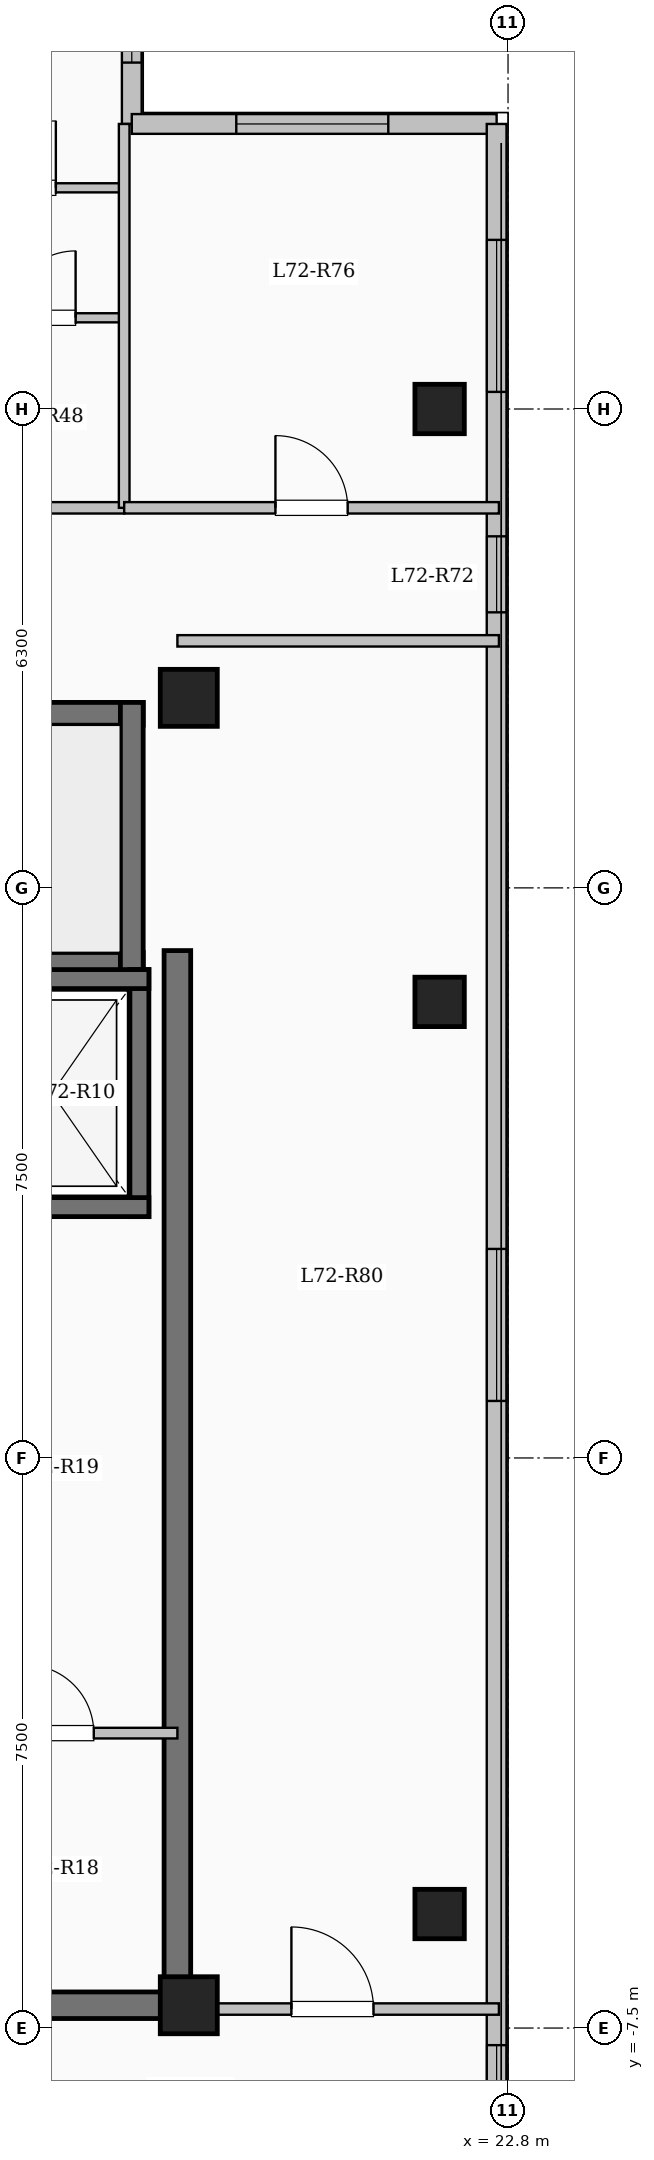
"""IFC4 building model, lengths in metres.
Left out: names, types, materials, properties, quantities, classifications, styles, units other than length and angle.
Written with IfcOpenShell. Run it as: python <this file> out.ifc"""

import sys

from ifc_helpers import new_model, si_unit, direction, frame, frame_2d, origin, origin_2d, place, context, subcontext, project, spatial, rectangle, extrude, element, fill, save


model = new_model("IFC4")
c1 = context("Model", 3, precision=1e-05, world=origin(), true_north=direction((0.0, 1.0)))
c2 = subcontext(c1, "Body", "Model", "MODEL_VIEW")
j1 = project(units=[si_unit("LENGTHUNIT", "METRE"), si_unit("PLANEANGLEUNIT", "RADIAN")], contexts=[c1])
p1 = place(None, origin())
s1 = spatial("IfcSite", under=j1, at=p1, CompositionType="ELEMENT")
p2 = place(p1, origin())
s2 = spatial("IfcBuilding", under=s1, at=p2, CompositionType="ELEMENT")
p3 = place(p2, frame((0.0, 0.0, 264.95)))
s3 = spatial("IfcBuildingStorey", under=s2, at=p3, CompositionType="ELEMENT", Elevation=264.95)
for number, where, z_axis, x_axis in (
    (1, (18.6, -7.2, 0.0), (0.0, 0.0, 1.0), (1.0, 0.0, 0.0)),
    (2, (18.6, 10.0, 0.0), (0.0, 0.0, 1.0), (1.0, 0.0, 0.0)),
):
    element("IfcColumn", number, at=place(p3, frame(where, z_axis=z_axis, x_axis=x_axis)), inside=s3, PredefinedType="COLUMN", context=c2, shape_type="SweptSolid", body=[
        extrude(rectangle(XDim=0.75, YDim=0.75, at=origin_2d()), origin(), (0.0, 0.0, 1.0), 3.35),
    ])
for number, where, z_axis, x_axis in (
    (3, (21.9, -6.0, 0.0), (0.0, 0.0, 1.0), (1.0, 0.0, 0.0)),
    (4, (21.9, 6.0, 0.0), (0.0, 0.0, 1.0), (1.0, 0.0, 0.0)),
    (5, (21.9, 13.8, 0.0), (0.0, 0.0, 1.0), (1.0, 0.0, 0.0)),
):
    element("IfcColumn", number, at=place(p3, frame(where, z_axis=z_axis, x_axis=x_axis)), inside=s3, PredefinedType="COLUMN", context=c2, shape_type="SweptSolid", body=[
        extrude(rectangle(XDim=0.65, YDim=0.65, at=origin_2d()), origin(), (0.0, 0.0, 1.0), 3.35),
    ])
p4 = place(p3, frame((17.85, 20.85, 0.0), z_axis=(0.0, 0.0, 1.0), x_axis=(0.0, -1.0, 0.0)))
e6 = element("IfcWall", 6, at=p4, inside=s3, PredefinedType="SOLIDWALL", context=c2, shape_type="SweptSolid", body=[
    extrude(rectangle(XDim=3.3, YDim=0.26, at=frame_2d((1.65, 0.0))), origin(), (0.0, 0.0, 1.0), 3.1),
])
p5 = place(p4, frame((0.843, 0.0, 0.9)))
e7 = element("IfcOpeningElement", 7, at=p5, cuts=e6, PredefinedType="OPENING", context=c2, shape_type="SweptSolid", body=[
    extrude(rectangle(XDim=1.65, YDim=1.6, at=frame_2d((0.825, 0.8))), frame((0.0, 0.14, 0.0), z_axis=(0.0, -1.0, 0.0), x_axis=(1.0, 0.0, 0.0)), (0.0, 0.0, 1.0), 0.28),
])
p6 = place(p3, frame((17.85, 17.55, 0.0), z_axis=(0.0, 0.0, 1.0), x_axis=(1.0, 0.0, 0.0)))
e8 = element("IfcWall", 8, at=p6, inside=s3, PredefinedType="SOLIDWALL", context=c2, shape_type="SweptSolid", body=[
    extrude(rectangle(XDim=4.8, YDim=0.26, at=frame_2d((2.4, 0.0))), origin(), (0.0, 0.0, 1.0), 3.1),
])
p7 = place(p6, frame((1.375, 0.0, 0.9)))
e9 = element("IfcOpeningElement", 9, at=p7, cuts=e8, PredefinedType="OPENING", context=c2, shape_type="SweptSolid", body=[
    extrude(rectangle(XDim=2.0, YDim=1.7, at=frame_2d((1.0, 0.85))), frame((0.0, 0.14, 0.0), z_axis=(0.0, -1.0, 0.0), x_axis=(1.0, 0.0, 0.0)), (0.0, 0.0, 1.0), 0.28),
])
p8 = place(p3, frame((22.65, 17.55, 0.0), z_axis=(0.0, 0.0, 1.0), x_axis=(0.0, -1.0, 0.0)))
e10 = element("IfcWall", 10, at=p8, inside=s3, PredefinedType="SOLIDWALL", context=c2, shape_type="SweptSolid", body=[
    extrude(rectangle(XDim=35.1, YDim=0.26, at=frame_2d((17.55, 0.0))), origin(), (0.0, 0.0, 1.0), 3.1),
])
p9 = place(p8, frame((1.525, 0.0, 0.9)))
e11 = element("IfcOpeningElement", 11, at=p9, cuts=e10, PredefinedType="OPENING", context=c2, shape_type="SweptSolid", body=[
    extrude(rectangle(XDim=2.0, YDim=1.7, at=frame_2d((1.0, 0.85))), frame((0.0, 0.14, 0.0), z_axis=(0.0, -1.0, 0.0), x_axis=(1.0, 0.0, 0.0)), (0.0, 0.0, 1.0), 0.28),
])
p10 = place(p8, frame((5.425, 0.0, 0.95)))
e12 = element("IfcOpeningElement", 12, at=p10, cuts=e10, PredefinedType="OPENING", context=c2, shape_type="SweptSolid", body=[
    extrude(rectangle(XDim=1.0, YDim=1.5, at=frame_2d((0.5, 0.75))), frame((0.0, 0.14, 0.0), z_axis=(0.0, -1.0, 0.0), x_axis=(1.0, 0.0, 0.0)), (0.0, 0.0, 1.0), 0.28),
])
p11 = place(p8, frame((14.8, 0.0, 0.9)))
e13 = element("IfcOpeningElement", 13, at=p11, cuts=e10, PredefinedType="OPENING", context=c2, shape_type="SweptSolid", body=[
    extrude(rectangle(XDim=2.0, YDim=1.7, at=frame_2d((1.0, 0.85))), frame((0.0, 0.14, 0.0), z_axis=(0.0, -1.0, 0.0), x_axis=(1.0, 0.0, 0.0)), (0.0, 0.0, 1.0), 0.28),
])
p12 = place(p8, frame((25.275, 0.0, 0.95)))
e14 = element("IfcOpeningElement", 14, at=p12, cuts=e10, PredefinedType="OPENING", context=c2, shape_type="SweptSolid", body=[
    extrude(rectangle(XDim=1.2, YDim=1.5, at=frame_2d((0.6, 0.75))), frame((0.0, 0.14, 0.0), z_axis=(0.0, -1.0, 0.0), x_axis=(1.0, 0.0, 0.0)), (0.0, 0.0, 1.0), 0.28),
])
p13 = place(p8, frame((29.925, 0.0, 0.9)))
e15 = element("IfcOpeningElement", 15, at=p13, cuts=e10, PredefinedType="OPENING", context=c2, shape_type="SweptSolid", body=[
    extrude(rectangle(XDim=2.2, YDim=1.75, at=frame_2d((1.1, 0.875))), frame((0.0, 0.14, 0.0), z_axis=(0.0, -1.0, 0.0), x_axis=(1.0, 0.0, 0.0)), (0.0, 0.0, 1.0), 0.28),
])
p14 = place(p3, frame((10.0, 9.79, 0.0), z_axis=(0.0, 0.0, 1.0), x_axis=(1.0, 0.0, 0.0)))
e16 = element("IfcWall", 16, at=p14, inside=s3, PredefinedType="SHEAR", context=c2, shape_type="SweptSolid", body=[
    extrude(rectangle(XDim=8.0, YDim=0.3, at=frame_2d((4.0, 0.0))), origin(), (0.0, 0.0, 1.0), 3.35),
])
p15 = place(p3, frame((10.0, 6.5, 0.0), z_axis=(0.0, 0.0, 1.0), x_axis=(1.0, 0.0, 0.0)))
e17 = element("IfcWall", 17, at=p15, inside=s3, PredefinedType="SHEAR", context=c2, shape_type="SweptSolid", body=[
    extrude(rectangle(XDim=8.0, YDim=0.3, at=frame_2d((4.0, 0.0))), origin(), (0.0, 0.0, 1.0), 3.35),
])
p16 = place(p15, frame((0.55, 0.0, 0.0)))
e18 = element("IfcOpeningElement", 18, at=p16, cuts=e17, PredefinedType="OPENING", context=c2, shape_type="SweptSolid", body=[
    extrude(rectangle(XDim=1.0, YDim=2.15, at=frame_2d((0.5, 1.075))), frame((0.0, 0.16, 0.0), z_axis=(0.0, -1.0, 0.0), x_axis=(1.0, 0.0, 0.0)), (0.0, 0.0, 1.0), 0.32),
])
p17 = place(p3, frame((17.85, 6.35, 0.0), z_axis=(0.0, 0.0, 1.0), x_axis=(0.0, 1.0, 0.0)))
e19 = element("IfcWall", 19, at=p17, inside=s3, PredefinedType="SHEAR", context=c2, shape_type="SweptSolid", body=[
    extrude(rectangle(XDim=3.59, YDim=0.3, at=frame_2d((1.795, 0.0))), origin(), (0.0, 0.0, 1.0), 3.35),
])
p18 = place(p3, frame((17.95, 3.175, 0.0), z_axis=(0.0, 0.0, 1.0), x_axis=(0.0, 1.0, 0.0)))
e20 = element("IfcWall", 20, at=p18, inside=s3, PredefinedType="SHEAR", context=c2, shape_type="SweptSolid", body=[
    extrude(rectangle(XDim=3.25, YDim=0.25, at=frame_2d((1.625, 0.0))), origin(), (0.0, 0.0, 1.0), 3.35),
])
for number, where, z_axis, x_axis in (
    (21, (15.525, 3.3, 0.0), (0.0, 0.0, 1.0), (1.0, 0.0, 0.0)),
    (22, (15.525, 6.3, 0.0), (0.0, 0.0, 1.0), (1.0, 0.0, 0.0)),
):
    element("IfcWall", number, at=place(p3, frame(where, z_axis=z_axis, x_axis=x_axis)), inside=s3, PredefinedType="SHEAR", context=c2, shape_type="SweptSolid", body=[
        extrude(rectangle(XDim=2.55, YDim=0.25, at=frame_2d((1.275, 0.0))), origin(), (0.0, 0.0, 1.0), 3.35),
    ])
p19 = place(p3, frame((18.45, -7.375, 0.0), z_axis=(0.0, 0.0, 1.0), x_axis=(0.0, 1.0, 0.0)))
e23 = element("IfcWall", 23, at=p19, inside=s3, PredefinedType="SHEAR", context=c2, shape_type="SweptSolid", body=[
    extrude(rectangle(XDim=14.05, YDim=0.35, at=frame_2d((7.025, 0.0))), origin(), (0.0, 0.0, 1.0), 3.35),
])
p20 = place(p3, frame((12.625, -7.2, 0.0), z_axis=(0.0, 0.0, 1.0), x_axis=(1.0, 0.0, 0.0)))
e24 = element("IfcWall", 24, at=p20, inside=s3, PredefinedType="SHEAR", context=c2, shape_type="SweptSolid", body=[
    extrude(rectangle(XDim=6.0, YDim=0.35, at=frame_2d((3.0, 0.0))), origin(), (0.0, 0.0, 1.0), 3.35),
])
p21 = place(p3, frame((15.4, -3.62, 0.0), z_axis=(0.0, 0.0, 1.0), x_axis=(1.0, 0.0, 0.0)))
e25 = element("IfcWall", 25, at=p21, inside=s3, PredefinedType="PARTITIONING", context=c2, shape_type="SweptSolid", body=[
    extrude(rectangle(XDim=3.05, YDim=0.14, at=frame_2d((1.525, 0.0))), origin(), (0.0, 0.0, 1.0), 3.1),
])
p22 = place(p21, frame((1.05, 0.0, 0.0)))
e26 = element("IfcOpeningElement", 26, at=p22, cuts=e25, PredefinedType="OPENING", context=c2, shape_type="SweptSolid", body=[
    extrude(rectangle(XDim=0.9, YDim=2.08, at=frame_2d((0.45, 1.04))), frame((0.0, 0.08, 0.0), z_axis=(0.0, -1.0, 0.0), x_axis=(1.0, 0.0, 0.0)), (0.0, 0.0, 1.0), 0.16),
])
p23 = place(p3, frame((3.85, 12.5, 0.0), z_axis=(0.0, 0.0, 1.0), x_axis=(1.0, 0.0, 0.0)))
e27 = element("IfcWall", 27, at=p23, inside=s3, PredefinedType="PARTITIONING", context=c2, shape_type="SweptSolid", body=[
    extrude(rectangle(XDim=13.9, YDim=0.15, at=frame_2d((6.95, 0.0))), origin(), (0.0, 0.0, 1.0), 3.1),
])
p24 = place(p23, frame((0.7, 0.0, 0.0)))
e28 = element("IfcOpeningElement", 28, at=p24, cuts=e27, PredefinedType="OPENING", context=c2, shape_type="SweptSolid", body=[
    extrude(rectangle(XDim=0.96, YDim=2.15, at=frame_2d((0.48, 1.075))), frame((0.0, 0.085, 0.0), z_axis=(0.0, -1.0, 0.0), x_axis=(1.0, 0.0, 0.0)), (0.0, 0.0, 1.0), 0.17),
])
p25 = place(p23, frame((6.35, 0.0, 0.0)))
e29 = element("IfcOpeningElement", 29, at=p25, cuts=e27, PredefinedType="OPENING", context=c2, shape_type="SweptSolid", body=[
    extrude(rectangle(XDim=0.96, YDim=2.15, at=frame_2d((0.48, 1.075))), frame((0.0, 0.085, 0.0), z_axis=(0.0, -1.0, 0.0), x_axis=(1.0, 0.0, 0.0)), (0.0, 0.0, 1.0), 0.17),
])
p26 = place(p3, frame((15.592, 15.0, 0.0), z_axis=(0.0, 0.0, 1.0), x_axis=(1.0, 0.0, 0.0)))
e30 = element("IfcWall", 30, at=p26, inside=s3, PredefinedType="PARTITIONING", context=c2, shape_type="SweptSolid", body=[
    extrude(rectangle(XDim=2.158, YDim=0.12, at=frame_2d((1.079, 0.0))), origin(), (0.0, 0.0, 1.0), 3.1),
])
p27 = place(p26, frame((0.639, 0.0, 0.0)))
e31 = element("IfcOpeningElement", 31, at=p27, cuts=e30, PredefinedType="OPENING", context=c2, shape_type="SweptSolid", body=[
    extrude(rectangle(XDim=0.88, YDim=2.1, at=frame_2d((0.44, 1.05))), frame((0.0, 0.07, 0.0), z_axis=(0.0, -1.0, 0.0), x_axis=(1.0, 0.0, 0.0)), (0.0, 0.0, 1.0), 0.14),
])
p28 = place(p3, frame((12.752, 16.71, 0.0), z_axis=(0.0, 0.0, 1.0), x_axis=(1.0, 0.0, 0.0)))
e32 = element("IfcWall", 32, at=p28, inside=s3, PredefinedType="PARTITIONING", context=c2, shape_type="SweptSolid", body=[
    extrude(rectangle(XDim=5.058, YDim=0.12, at=frame_2d((2.529, 0.0))), origin(), (0.0, 0.0, 1.0), 2.785),
])
p29 = place(p28, frame((0.78, 0.0, 0.0)))
e33 = element("IfcOpeningElement", 33, at=p29, cuts=e32, PredefinedType="OPENING", context=c2, shape_type="SweptSolid", body=[
    extrude(rectangle(XDim=0.88, YDim=2.1, at=frame_2d((0.44, 1.05))), frame((0.0, 0.07, 0.0), z_axis=(0.0, -1.0, 0.0), x_axis=(1.0, 0.0, 0.0)), (0.0, 0.0, 1.0), 0.14),
])
p30 = place(p28, frame((3.219, 0.0, 0.0)))
e34 = element("IfcOpeningElement", 34, at=p30, cuts=e32, PredefinedType="OPENING", context=c2, shape_type="SweptSolid", body=[
    extrude(rectangle(XDim=0.88, YDim=2.1, at=frame_2d((0.44, 1.05))), frame((0.0, 0.07, 0.0), z_axis=(0.0, -1.0, 0.0), x_axis=(1.0, 0.0, 0.0)), (0.0, 0.0, 1.0), 0.14),
])
p31 = place(p3, frame((18.45, -7.25, 0.0), z_axis=(0.0, 0.0, 1.0), x_axis=(1.0, 0.0, 0.0)))
e35 = element("IfcWall", 35, at=p31, inside=s3, PredefinedType="PARTITIONING", context=c2, shape_type="SweptSolid", body=[
    extrude(rectangle(XDim=4.23, YDim=0.15, at=frame_2d((2.115, 0.0))), origin(), (0.0, 0.0, 1.0), 3.1),
])
p32 = place(p31, frame((1.5, 0.0, 0.0)))
e36 = element("IfcOpeningElement", 36, at=p32, cuts=e35, PredefinedType="OPENING", context=c2, shape_type="SweptSolid", body=[
    extrude(rectangle(XDim=1.08, YDim=2.15, at=frame_2d((0.54, 1.075))), frame((0.0, 0.085, 0.0), z_axis=(0.0, -1.0, 0.0), x_axis=(1.0, 0.0, 0.0)), (0.0, 0.0, 1.0), 0.17),
])
p33 = place(p3, frame((18.45, 10.75, 0.0), z_axis=(0.0, 0.0, 1.0), x_axis=(1.0, 0.0, 0.0)))
e37 = element("IfcWall", 37, at=p33, inside=s3, PredefinedType="PARTITIONING", context=c2, shape_type="SweptSolid", body=[
    extrude(rectangle(XDim=4.23, YDim=0.15, at=frame_2d((2.115, 0.0))), origin(), (0.0, 0.0, 1.0), 3.1),
])
p34 = place(p3, frame((17.75, 12.5, 0.0), z_axis=(0.0, 0.0, 1.0), x_axis=(0.0, 1.0, 0.0)))
e38 = element("IfcWall", 38, at=p34, inside=s3, PredefinedType="PARTITIONING", context=c2, shape_type="SweptSolid", body=[
    extrude(rectangle(XDim=5.05, YDim=0.14, at=frame_2d((2.525, 0.0))), origin(), (0.0, 0.0, 1.0), 3.1),
])
p35 = place(p3, frame((17.75, 12.5, 0.0), z_axis=(0.0, 0.0, 1.0), x_axis=(1.0, 0.0, 0.0)))
e39 = element("IfcWall", 39, at=p35, inside=s3, PredefinedType="PARTITIONING", context=c2, shape_type="SweptSolid", body=[
    extrude(rectangle(XDim=4.93, YDim=0.15, at=frame_2d((2.465, 0.0))), origin(), (0.0, 0.0, 1.0), 3.1),
])
p36 = place(p35, frame((1.99, 0.0, 0.0)))
e40 = element("IfcOpeningElement", 40, at=p36, cuts=e39, PredefinedType="OPENING", context=c2, shape_type="SweptSolid", body=[
    extrude(rectangle(XDim=0.95, YDim=2.15, at=frame_2d((0.475, 1.075))), frame((0.0, 0.085, 0.0), z_axis=(0.0, -1.0, 0.0), x_axis=(1.0, 0.0, 0.0)), (0.0, 0.0, 1.0), 0.17),
])
p37 = place(p5, origin())
e41 = element("IfcWindow", 41, at=p37, inside=s3, PartitioningType="SINGLE_PANEL", PredefinedType="WINDOW", context=c2, shape_type="SweptSolid", body=[
    extrude(rectangle(XDim=1.65, YDim=1.6, at=frame_2d((0.825, 0.8))), frame((0.0, 0.03, 0.0), z_axis=(0.0, -1.0, 0.0), x_axis=(1.0, 0.0, 0.0)), (0.0, 0.0, 1.0), 0.06),
])
fill(e7, e41)
p38 = place(p7, origin())
e42 = element("IfcWindow", 42, at=p38, inside=s3, PartitioningType="SINGLE_PANEL", PredefinedType="WINDOW", context=c2, shape_type="SweptSolid", body=[
    extrude(rectangle(XDim=2.0, YDim=1.7, at=frame_2d((1.0, 0.85))), frame((0.0, 0.03, 0.0), z_axis=(0.0, -1.0, 0.0), x_axis=(1.0, 0.0, 0.0)), (0.0, 0.0, 1.0), 0.06),
])
fill(e9, e42)
p39 = place(p9, origin())
e43 = element("IfcWindow", 43, at=p39, inside=s3, PartitioningType="SINGLE_PANEL", PredefinedType="WINDOW", context=c2, shape_type="SweptSolid", body=[
    extrude(rectangle(XDim=2.0, YDim=1.7, at=frame_2d((1.0, 0.85))), frame((0.0, 0.03, 0.0), z_axis=(0.0, -1.0, 0.0), x_axis=(1.0, 0.0, 0.0)), (0.0, 0.0, 1.0), 0.06),
])
fill(e11, e43)
p40 = place(p10, origin())
e44 = element("IfcWindow", 44, at=p40, inside=s3, PartitioningType="SINGLE_PANEL", PredefinedType="WINDOW", context=c2, shape_type="SweptSolid", body=[
    extrude(rectangle(XDim=1.0, YDim=1.5, at=frame_2d((0.5, 0.75))), frame((0.0, 0.03, 0.0), z_axis=(0.0, -1.0, 0.0), x_axis=(1.0, 0.0, 0.0)), (0.0, 0.0, 1.0), 0.06),
])
fill(e12, e44)
p41 = place(p11, origin())
e45 = element("IfcWindow", 45, at=p41, inside=s3, PartitioningType="SINGLE_PANEL", PredefinedType="WINDOW", context=c2, shape_type="SweptSolid", body=[
    extrude(rectangle(XDim=2.0, YDim=1.7, at=frame_2d((1.0, 0.85))), frame((0.0, 0.03, 0.0), z_axis=(0.0, -1.0, 0.0), x_axis=(1.0, 0.0, 0.0)), (0.0, 0.0, 1.0), 0.06),
])
fill(e13, e45)
p42 = place(p12, origin())
e46 = element("IfcWindow", 46, at=p42, inside=s3, PartitioningType="SINGLE_PANEL", PredefinedType="WINDOW", context=c2, shape_type="SweptSolid", body=[
    extrude(rectangle(XDim=1.2, YDim=1.5, at=frame_2d((0.6, 0.75))), frame((0.0, 0.03, 0.0), z_axis=(0.0, -1.0, 0.0), x_axis=(1.0, 0.0, 0.0)), (0.0, 0.0, 1.0), 0.06),
])
fill(e14, e46)
p43 = place(p22, origin())
e47 = element("IfcDoor", 47, at=p43, inside=s3, OperationType="SINGLE_SWING_LEFT", PredefinedType="DOOR", context=c2, shape_type="SweptSolid", body=[
    extrude(rectangle(XDim=0.9, YDim=2.08, at=frame_2d((0.45, 1.04))), frame((0.0, 0.025, 0.0), z_axis=(0.0, -1.0, 0.0), x_axis=(1.0, 0.0, 0.0)), (0.0, 0.0, 1.0), 0.05),
])
fill(e26, e47)
p44 = place(p27, origin())
e48 = element("IfcDoor", 48, at=p44, inside=s3, OperationType="SINGLE_SWING_RIGHT", PredefinedType="DOOR", context=c2, shape_type="SweptSolid", body=[
    extrude(rectangle(XDim=0.88, YDim=2.1, at=frame_2d((0.44, 1.05))), frame((0.0, 0.025, 0.0), z_axis=(0.0, -1.0, 0.0), x_axis=(1.0, 0.0, 0.0)), (0.0, 0.0, 1.0), 0.05),
])
fill(e31, e48)
p45 = place(p30, origin())
e49 = element("IfcDoor", 49, at=p45, inside=s3, OperationType="SINGLE_SWING_RIGHT", PredefinedType="DOOR", context=c2, shape_type="SweptSolid", body=[
    extrude(rectangle(XDim=0.88, YDim=2.1, at=frame_2d((0.44, 1.05))), frame((0.0, 0.025, 0.0), z_axis=(0.0, -1.0, 0.0), x_axis=(1.0, 0.0, 0.0)), (0.0, 0.0, 1.0), 0.05),
])
fill(e34, e49)
p46 = place(p36, origin())
e50 = element("IfcDoor", 50, at=p46, inside=s3, OperationType="SINGLE_SWING_LEFT", PredefinedType="DOOR", context=c2, shape_type="SweptSolid", body=[
    extrude(rectangle(XDim=0.95, YDim=2.15, at=frame_2d((0.475, 1.075))), frame((0.0, 0.025, 0.0), z_axis=(0.0, -1.0, 0.0), x_axis=(1.0, 0.0, 0.0)), (0.0, 0.0, 1.0), 0.05),
])
fill(e40, e50)
p47 = place(p32, origin())
e51 = element("IfcDoor", 51, at=p47, inside=s3, OperationType="SINGLE_SWING_LEFT", PredefinedType="DOOR", context=c2, shape_type="SweptSolid", body=[
    extrude(rectangle(XDim=1.08, YDim=2.15, at=frame_2d((0.54, 1.075))), frame((0.0, 0.025, 0.0), z_axis=(0.0, -1.0, 0.0), x_axis=(1.0, 0.0, 0.0)), (0.0, 0.0, 1.0), 0.05),
])
fill(e36, e51)
save(model, sys.argv[1])
